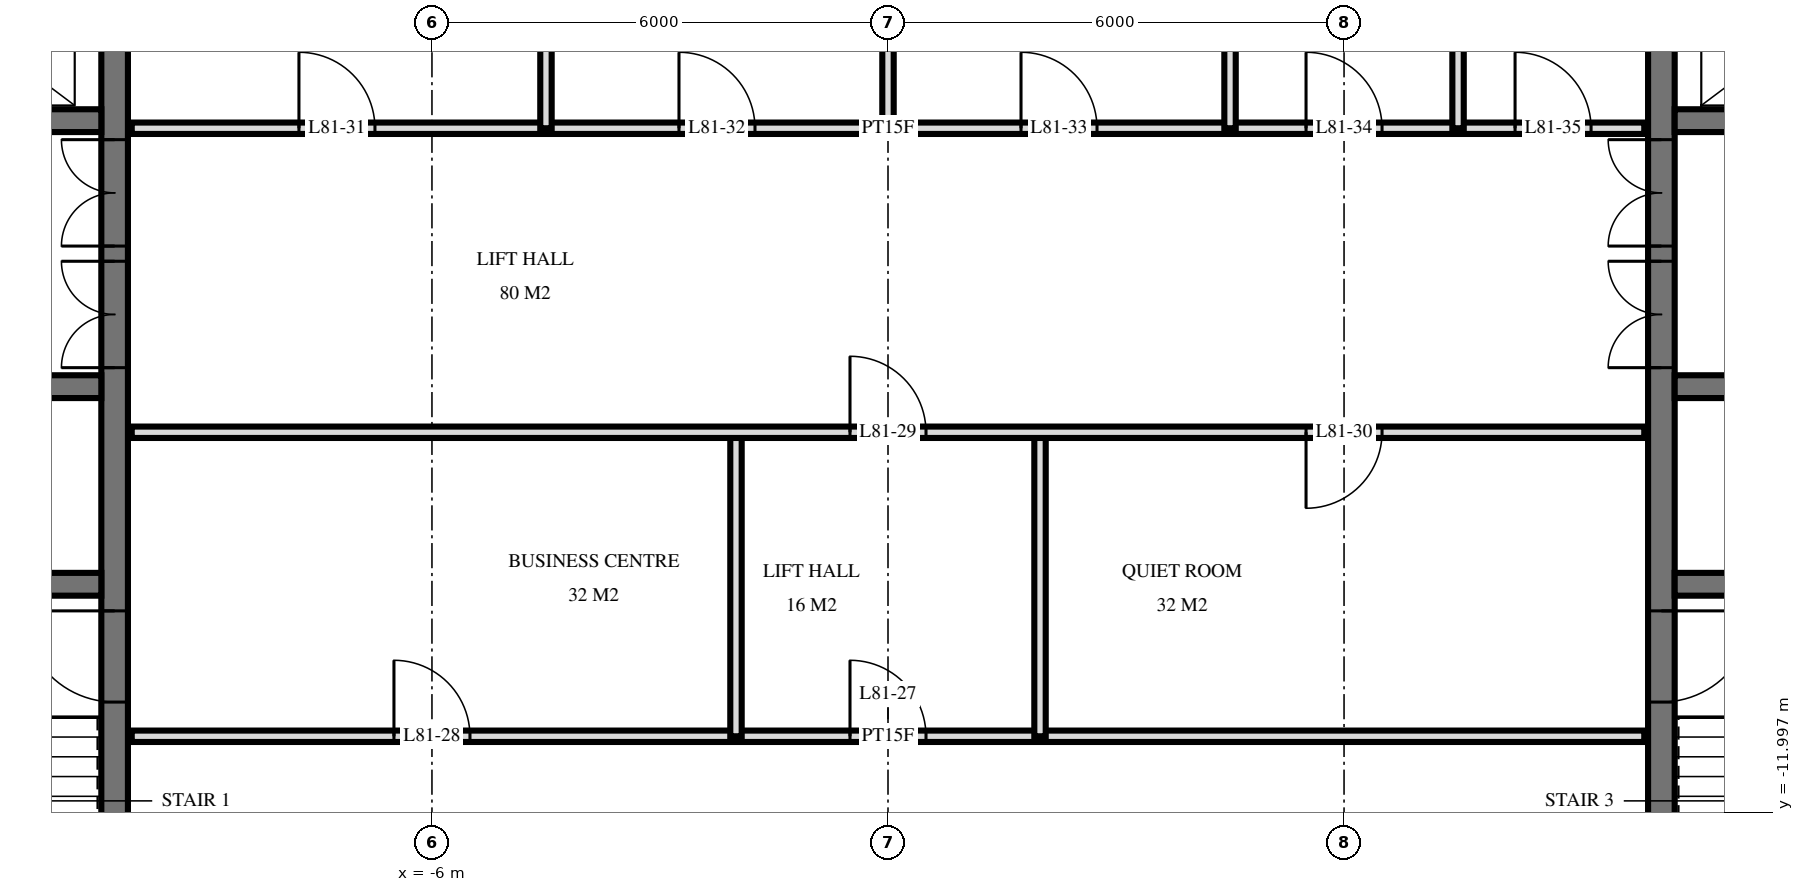
"""IFC4 building model, lengths in metres.
Left out: names, types, materials, properties, quantities, classifications, styles, units other than length and angle.
Written with IfcOpenShell. Run it as: python <this file> out.ifc"""

import sys

from ifc_helpers import new_model, si_unit, direction, frame, frame_2d, origin, place, context, subcontext, project, spatial, rectangle, extrude, element, fill, save


model = new_model("IFC4")
c1 = context("Model", 3, precision=1e-05, world=origin(), true_north=direction((0.0, 1.0)))
c2 = subcontext(c1, "Body", "Model", "MODEL_VIEW")
j1 = project(units=[si_unit("LENGTHUNIT", "METRE"), si_unit("PLANEANGLEUNIT", "RADIAN")], contexts=[c1])
p1 = place(None, origin())
s1 = spatial("IfcSite", under=j1, at=p1, CompositionType="ELEMENT")
p2 = place(p1, origin())
s2 = spatial("IfcBuilding", under=s1, at=p2, CompositionType="ELEMENT")
p3 = place(p2, frame((0.0, 0.0, 305.1)))
s3 = spatial("IfcBuildingStorey", under=s2, at=p3, CompositionType="ELEMENT", Elevation=305.1)
p4 = place(p3, frame((-10.175, -14.55, 0.0), z_axis=(0.0, 0.0, 1.0), x_axis=(0.0, 1.0, 0.0)))
e1 = element("IfcWall", 1, at=p4, inside=s3, PredefinedType="SHEAR", context=c2, shape_type="SweptSolid", body=[
    extrude(rectangle(XDim=14.1, YDim=0.35, at=frame_2d((7.05, 0.0))), origin(), (0.0, 0.0, 1.0), 3.5),
])
p5 = place(p4, frame((8.4, 0.0, 0.0)))
e2 = element("IfcOpeningElement", 2, at=p5, cuts=e1, PredefinedType="OPENING", context=c2, shape_type="SweptSolid", body=[
    extrude(rectangle(XDim=1.4, YDim=2.4, at=frame_2d((0.7, 1.2))), frame((0.0, 0.185, 0.0), z_axis=(0.0, -1.0, 0.0), x_axis=(1.0, 0.0, 0.0)), (0.0, 0.0, 1.0), 0.37),
])
p6 = place(p4, frame((10.0, 0.0, 0.0)))
e3 = element("IfcOpeningElement", 3, at=p6, cuts=e1, PredefinedType="OPENING", context=c2, shape_type="SweptSolid", body=[
    extrude(rectangle(XDim=1.4, YDim=2.4, at=frame_2d((0.7, 1.2))), frame((0.0, 0.185, 0.0), z_axis=(0.0, -1.0, 0.0), x_axis=(1.0, 0.0, 0.0)), (0.0, 0.0, 1.0), 0.37),
])
p7 = place(p4, frame((4.0, 0.0, 0.0)))
e4 = element("IfcOpeningElement", 4, at=p7, cuts=e1, PredefinedType="OPENING", context=c2, shape_type="SweptSolid", body=[
    extrude(rectangle(XDim=1.2, YDim=2.1, at=frame_2d((0.6, 1.05))), frame((0.0, 0.185, 0.0), z_axis=(0.0, -1.0, 0.0), x_axis=(1.0, 0.0, 0.0)), (0.0, 0.0, 1.0), 0.37),
])
p8 = place(p3, frame((-19.05, -2.9, 0.0), z_axis=(0.0, 0.0, 1.0), x_axis=(1.0, 0.0, 0.0)))
e5 = element("IfcWall", 5, at=p8, inside=s3, PredefinedType="SHEAR", context=c2, shape_type="SweptSolid", body=[
    extrude(rectangle(XDim=8.7, YDim=0.3, at=frame_2d((4.35, 0.0))), origin(), (0.0, 0.0, 1.0), 3.5),
])
p9 = place(p8, frame((6.8, 0.0, 0.0)))
e6 = element("IfcOpeningElement", 6, at=p9, cuts=e5, PredefinedType="OPENING", context=c2, shape_type="SweptSolid", body=[
    extrude(rectangle(XDim=1.1, YDim=2.1, at=frame_2d((0.55, 1.05))), frame((0.0, 0.16, 0.0), z_axis=(0.0, -1.0, 0.0), x_axis=(1.0, 0.0, 0.0)), (0.0, 0.0, 1.0), 0.32),
])
p10 = place(p8, frame((3.8, 0.0, 0.0)))
e7 = element("IfcOpeningElement", 7, at=p10, cuts=e5, PredefinedType="OPENING", context=c2, shape_type="SweptSolid", body=[
    extrude(rectangle(XDim=1.1, YDim=2.1, at=frame_2d((0.55, 1.05))), frame((0.0, 0.16, 0.0), z_axis=(0.0, -1.0, 0.0), x_axis=(1.0, 0.0, 0.0)), (0.0, 0.0, 1.0), 0.32),
])
p11 = place(p8, frame((0.9, 0.0, 0.0)))
e8 = element("IfcOpeningElement", 8, at=p11, cuts=e5, PredefinedType="OPENING", context=c2, shape_type="SweptSolid", body=[
    extrude(rectangle(XDim=0.9, YDim=2.1, at=frame_2d((0.45, 1.05))), frame((0.0, 0.16, 0.0), z_axis=(0.0, -1.0, 0.0), x_axis=(1.0, 0.0, 0.0)), (0.0, 0.0, 1.0), 0.32),
])
p12 = place(p3, frame((-19.05, -6.4, 0.0), z_axis=(0.0, 0.0, 1.0), x_axis=(1.0, 0.0, 0.0)))
e9 = element("IfcWall", 9, at=p12, inside=s3, PredefinedType="SHEAR", context=c2, shape_type="SweptSolid", body=[
    extrude(rectangle(XDim=8.7, YDim=0.3, at=frame_2d((4.35, 0.0))), origin(), (0.0, 0.0, 1.0), 3.5),
])
p13 = place(p12, frame((0.8, 0.0, 0.0)))
e10 = element("IfcOpeningElement", 10, at=p13, cuts=e9, PredefinedType="OPENING", context=c2, shape_type="SweptSolid", body=[
    extrude(rectangle(XDim=1.1, YDim=2.1, at=frame_2d((0.55, 1.05))), frame((0.0, 0.16, 0.0), z_axis=(0.0, -1.0, 0.0), x_axis=(1.0, 0.0, 0.0)), (0.0, 0.0, 1.0), 0.32),
])
p14 = place(p3, frame((-19.05, -9.0, 0.0), z_axis=(0.0, 0.0, 1.0), x_axis=(1.0, 0.0, 0.0)))
e11 = element("IfcWall", 11, at=p14, inside=s3, PredefinedType="SHEAR", context=c2, shape_type="SweptSolid", body=[
    extrude(rectangle(XDim=8.7, YDim=0.3, at=frame_2d((4.35, 0.0))), origin(), (0.0, 0.0, 1.0), 3.5),
])
p15 = place(p14, frame((3.8, 0.0, 0.0)))
e12 = element("IfcOpeningElement", 12, at=p15, cuts=e11, PredefinedType="OPENING", context=c2, shape_type="SweptSolid", body=[
    extrude(rectangle(XDim=1.1, YDim=2.1, at=frame_2d((0.55, 1.05))), frame((0.0, 0.16, 0.0), z_axis=(0.0, -1.0, 0.0), x_axis=(1.0, 0.0, 0.0)), (0.0, 0.0, 1.0), 0.32),
])
p16 = place(p3, frame((10.175, -14.55, 0.0), z_axis=(0.0, 0.0, 1.0), x_axis=(0.0, 1.0, 0.0)))
e13 = element("IfcWall", 13, at=p16, inside=s3, PredefinedType="SHEAR", context=c2, shape_type="SweptSolid", body=[
    extrude(rectangle(XDim=14.1, YDim=0.35, at=frame_2d((7.05, 0.0))), origin(), (0.0, 0.0, 1.0), 3.5),
])
p17 = place(p16, frame((8.4, 0.0, 0.0)))
e14 = element("IfcOpeningElement", 14, at=p17, cuts=e13, PredefinedType="OPENING", context=c2, shape_type="SweptSolid", body=[
    extrude(rectangle(XDim=1.4, YDim=2.4, at=frame_2d((0.7, 1.2))), frame((0.0, 0.185, 0.0), z_axis=(0.0, -1.0, 0.0), x_axis=(1.0, 0.0, 0.0)), (0.0, 0.0, 1.0), 0.37),
])
p18 = place(p16, frame((10.0, 0.0, 0.0)))
e15 = element("IfcOpeningElement", 15, at=p18, cuts=e13, PredefinedType="OPENING", context=c2, shape_type="SweptSolid", body=[
    extrude(rectangle(XDim=1.4, YDim=2.4, at=frame_2d((0.7, 1.2))), frame((0.0, 0.185, 0.0), z_axis=(0.0, -1.0, 0.0), x_axis=(1.0, 0.0, 0.0)), (0.0, 0.0, 1.0), 0.37),
])
p19 = place(p16, frame((4.0, 0.0, 0.0)))
e16 = element("IfcOpeningElement", 16, at=p19, cuts=e13, PredefinedType="OPENING", context=c2, shape_type="SweptSolid", body=[
    extrude(rectangle(XDim=1.2, YDim=2.1, at=frame_2d((0.6, 1.05))), frame((0.0, 0.185, 0.0), z_axis=(0.0, -1.0, 0.0), x_axis=(1.0, 0.0, 0.0)), (0.0, 0.0, 1.0), 0.37),
])
p20 = place(p3, frame((10.35, -2.9, 0.0), z_axis=(0.0, 0.0, 1.0), x_axis=(1.0, 0.0, 0.0)))
e17 = element("IfcWall", 17, at=p20, inside=s3, PredefinedType="SHEAR", context=c2, shape_type="SweptSolid", body=[
    extrude(rectangle(XDim=8.7, YDim=0.3, at=frame_2d((4.35, 0.0))), origin(), (0.0, 0.0, 1.0), 3.5),
])
p21 = place(p20, frame((0.8, 0.0, 0.0)))
e18 = element("IfcOpeningElement", 18, at=p21, cuts=e17, PredefinedType="OPENING", context=c2, shape_type="SweptSolid", body=[
    extrude(rectangle(XDim=1.1, YDim=2.1, at=frame_2d((0.55, 1.05))), frame((0.0, 0.16, 0.0), z_axis=(0.0, -1.0, 0.0), x_axis=(1.0, 0.0, 0.0)), (0.0, 0.0, 1.0), 0.32),
])
p22 = place(p20, frame((3.8, 0.0, 0.0)))
e19 = element("IfcOpeningElement", 19, at=p22, cuts=e17, PredefinedType="OPENING", context=c2, shape_type="SweptSolid", body=[
    extrude(rectangle(XDim=1.1, YDim=2.1, at=frame_2d((0.55, 1.05))), frame((0.0, 0.16, 0.0), z_axis=(0.0, -1.0, 0.0), x_axis=(1.0, 0.0, 0.0)), (0.0, 0.0, 1.0), 0.32),
])
p23 = place(p20, frame((6.9, 0.0, 0.0)))
e20 = element("IfcOpeningElement", 20, at=p23, cuts=e17, PredefinedType="OPENING", context=c2, shape_type="SweptSolid", body=[
    extrude(rectangle(XDim=0.9, YDim=2.1, at=frame_2d((0.45, 1.05))), frame((0.0, 0.16, 0.0), z_axis=(0.0, -1.0, 0.0), x_axis=(1.0, 0.0, 0.0)), (0.0, 0.0, 1.0), 0.32),
])
p24 = place(p3, frame((10.35, -6.4, 0.0), z_axis=(0.0, 0.0, 1.0), x_axis=(1.0, 0.0, 0.0)))
e21 = element("IfcWall", 21, at=p24, inside=s3, PredefinedType="SHEAR", context=c2, shape_type="SweptSolid", body=[
    extrude(rectangle(XDim=8.7, YDim=0.3, at=frame_2d((4.35, 0.0))), origin(), (0.0, 0.0, 1.0), 3.5),
])
p25 = place(p24, frame((6.8, 0.0, 0.0)))
e22 = element("IfcOpeningElement", 22, at=p25, cuts=e21, PredefinedType="OPENING", context=c2, shape_type="SweptSolid", body=[
    extrude(rectangle(XDim=1.1, YDim=2.1, at=frame_2d((0.55, 1.05))), frame((0.0, 0.16, 0.0), z_axis=(0.0, -1.0, 0.0), x_axis=(1.0, 0.0, 0.0)), (0.0, 0.0, 1.0), 0.32),
])
p26 = place(p3, frame((10.35, -9.0, 0.0), z_axis=(0.0, 0.0, 1.0), x_axis=(1.0, 0.0, 0.0)))
e23 = element("IfcWall", 23, at=p26, inside=s3, PredefinedType="SHEAR", context=c2, shape_type="SweptSolid", body=[
    extrude(rectangle(XDim=8.7, YDim=0.3, at=frame_2d((4.35, 0.0))), origin(), (0.0, 0.0, 1.0), 3.5),
])
p27 = place(p26, frame((3.8, 0.0, 0.0)))
e24 = element("IfcOpeningElement", 24, at=p27, cuts=e23, PredefinedType="OPENING", context=c2, shape_type="SweptSolid", body=[
    extrude(rectangle(XDim=1.1, YDim=2.1, at=frame_2d((0.55, 1.05))), frame((0.0, 0.16, 0.0), z_axis=(0.0, -1.0, 0.0), x_axis=(1.0, 0.0, 0.0)), (0.0, 0.0, 1.0), 0.32),
])
for number, where, z_axis, x_axis in (
    (25, (7.5, -3.0, 0.0), (0.0, 0.0, 1.0), (0.0, 1.0, 0.0)),
    (26, (4.5, -3.0, 0.0), (0.0, 0.0, 1.0), (0.0, 1.0, 0.0)),
):
    element("IfcWall", number, at=place(p3, frame(where, z_axis=z_axis, x_axis=x_axis)), inside=s3, PredefinedType="PLUMBINGWALL", context=c2, shape_type="SweptSolid", body=[
        extrude(rectangle(XDim=4.02, YDim=0.15, at=frame_2d((2.01, 0.0))), origin(), (0.0, 0.0, 1.0), 3.22),
    ])
p28 = place(p3, frame((2.0, -11.0, 0.0), z_axis=(0.0, 0.0, 1.0), x_axis=(0.0, 1.0, 0.0)))
e27 = element("IfcWall", 27, at=p28, inside=s3, PredefinedType="PARTITIONING", context=c2, shape_type="SweptSolid", body=[
    extrude(rectangle(XDim=4.0, YDim=0.15, at=frame_2d((2.0, 0.0))), origin(), (0.0, 0.0, 1.0), 3.22),
])
p29 = place(p3, frame((0.0, -3.0, 0.0), z_axis=(0.0, 0.0, 1.0), x_axis=(0.0, 1.0, 0.0)))
e28 = element("IfcWall", 28, at=p29, inside=s3, PredefinedType="PARTITIONING", context=c2, shape_type="SweptSolid", body=[
    extrude(rectangle(XDim=4.02, YDim=0.15, at=frame_2d((2.01, 0.0))), origin(), (0.0, 0.0, 1.0), 3.22),
])
p30 = place(p3, frame((-2.0, -11.0, 0.0), z_axis=(0.0, 0.0, 1.0), x_axis=(0.0, 1.0, 0.0)))
e29 = element("IfcWall", 29, at=p30, inside=s3, PredefinedType="PARTITIONING", context=c2, shape_type="SweptSolid", body=[
    extrude(rectangle(XDim=4.0, YDim=0.15, at=frame_2d((2.0, 0.0))), origin(), (0.0, 0.0, 1.0), 3.22),
])
p31 = place(p3, frame((-4.5, -3.0, 0.0), z_axis=(0.0, 0.0, 1.0), x_axis=(0.0, 1.0, 0.0)))
e30 = element("IfcWall", 30, at=p31, inside=s3, PredefinedType="PARTITIONING", context=c2, shape_type="SweptSolid", body=[
    extrude(rectangle(XDim=4.02, YDim=0.15, at=frame_2d((2.01, 0.0))), origin(), (0.0, 0.0, 1.0), 3.22),
])
p32 = place(p3, frame((-9.95, -11.0, 0.0), z_axis=(0.0, 0.0, 1.0), x_axis=(1.0, 0.0, 0.0)))
e31 = element("IfcWall", 31, at=p32, inside=s3, PredefinedType="PARTITIONING", context=c2, shape_type="SweptSolid", body=[
    extrude(rectangle(XDim=19.9, YDim=0.15, at=frame_2d((9.95, 0.0))), origin(), (0.0, 0.0, 1.0), 3.22),
])
p33 = place(p32, frame((9.45, 0.0, 0.0)))
e32 = element("IfcOpeningElement", 32, at=p33, cuts=e31, PredefinedType="OPENING", context=c2, shape_type="SweptSolid", body=[
    extrude(rectangle(XDim=1.0, YDim=2.1, at=frame_2d((0.5, 1.05))), frame((0.0, 0.085, 0.0), z_axis=(0.0, -1.0, 0.0), x_axis=(1.0, 0.0, 0.0)), (0.0, 0.0, 1.0), 0.17),
])
p34 = place(p32, frame((3.45, 0.0, 0.0)))
e33 = element("IfcOpeningElement", 33, at=p34, cuts=e31, PredefinedType="OPENING", context=c2, shape_type="SweptSolid", body=[
    extrude(rectangle(XDim=1.0, YDim=2.1, at=frame_2d((0.5, 1.05))), frame((0.0, 0.085, 0.0), z_axis=(0.0, -1.0, 0.0), x_axis=(1.0, 0.0, 0.0)), (0.0, 0.0, 1.0), 0.17),
])
p35 = place(p3, frame((-9.95, -7.0, 0.0), z_axis=(0.0, 0.0, 1.0), x_axis=(1.0, 0.0, 0.0)))
e34 = element("IfcWall", 34, at=p35, inside=s3, PredefinedType="PARTITIONING", context=c2, shape_type="SweptSolid", body=[
    extrude(rectangle(XDim=19.9, YDim=0.15, at=frame_2d((9.95, 0.0))), origin(), (0.0, 0.0, 1.0), 3.22),
])
p36 = place(p35, frame((9.45, 0.0, 0.0)))
e35 = element("IfcOpeningElement", 35, at=p36, cuts=e34, PredefinedType="OPENING", context=c2, shape_type="SweptSolid", body=[
    extrude(rectangle(XDim=1.0, YDim=2.1, at=frame_2d((0.5, 1.05))), frame((0.0, 0.085, 0.0), z_axis=(0.0, -1.0, 0.0), x_axis=(1.0, 0.0, 0.0)), (0.0, 0.0, 1.0), 0.17),
])
p37 = place(p35, frame((15.45, 0.0, 0.0)))
e36 = element("IfcOpeningElement", 36, at=p37, cuts=e34, PredefinedType="OPENING", context=c2, shape_type="SweptSolid", body=[
    extrude(rectangle(XDim=1.0, YDim=2.1, at=frame_2d((0.5, 1.05))), frame((0.0, 0.085, 0.0), z_axis=(0.0, -1.0, 0.0), x_axis=(1.0, 0.0, 0.0)), (0.0, 0.0, 1.0), 0.17),
])
p38 = place(p3, frame((-9.95, -3.0, 0.0), z_axis=(0.0, 0.0, 1.0), x_axis=(1.0, 0.0, 0.0)))
e37 = element("IfcWall", 37, at=p38, inside=s3, PredefinedType="PARTITIONING", context=c2, shape_type="SweptSolid", body=[
    extrude(rectangle(XDim=19.9, YDim=0.15, at=frame_2d((9.95, 0.0))), origin(), (0.0, 0.0, 1.0), 3.22),
])
p39 = place(p38, frame((2.2, 0.0, 0.0)))
e38 = element("IfcOpeningElement", 38, at=p39, cuts=e37, PredefinedType="OPENING", context=c2, shape_type="SweptSolid", body=[
    extrude(rectangle(XDim=1.0, YDim=2.1, at=frame_2d((0.5, 1.05))), frame((0.0, 0.085, 0.0), z_axis=(0.0, -1.0, 0.0), x_axis=(1.0, 0.0, 0.0)), (0.0, 0.0, 1.0), 0.17),
])
p40 = place(p38, frame((7.2, 0.0, 0.0)))
e39 = element("IfcOpeningElement", 39, at=p40, cuts=e37, PredefinedType="OPENING", context=c2, shape_type="SweptSolid", body=[
    extrude(rectangle(XDim=1.0, YDim=2.1, at=frame_2d((0.5, 1.05))), frame((0.0, 0.085, 0.0), z_axis=(0.0, -1.0, 0.0), x_axis=(1.0, 0.0, 0.0)), (0.0, 0.0, 1.0), 0.17),
])
p41 = place(p38, frame((11.7, 0.0, 0.0)))
e40 = element("IfcOpeningElement", 40, at=p41, cuts=e37, PredefinedType="OPENING", context=c2, shape_type="SweptSolid", body=[
    extrude(rectangle(XDim=1.0, YDim=2.1, at=frame_2d((0.5, 1.05))), frame((0.0, 0.085, 0.0), z_axis=(0.0, -1.0, 0.0), x_axis=(1.0, 0.0, 0.0)), (0.0, 0.0, 1.0), 0.17),
])
p42 = place(p38, frame((15.45, 0.0, 0.0)))
e41 = element("IfcOpeningElement", 41, at=p42, cuts=e37, PredefinedType="OPENING", context=c2, shape_type="SweptSolid", body=[
    extrude(rectangle(XDim=1.0, YDim=2.1, at=frame_2d((0.5, 1.05))), frame((0.0, 0.085, 0.0), z_axis=(0.0, -1.0, 0.0), x_axis=(1.0, 0.0, 0.0)), (0.0, 0.0, 1.0), 0.17),
])
p43 = place(p38, frame((18.2, 0.0, 0.0)))
e42 = element("IfcOpeningElement", 42, at=p43, cuts=e37, PredefinedType="OPENING", context=c2, shape_type="SweptSolid", body=[
    extrude(rectangle(XDim=1.0, YDim=2.1, at=frame_2d((0.5, 1.05))), frame((0.0, 0.085, 0.0), z_axis=(0.0, -1.0, 0.0), x_axis=(1.0, 0.0, 0.0)), (0.0, 0.0, 1.0), 0.17),
])
p44 = place(p5, origin())
e43 = element("IfcDoor", 43, at=p44, inside=s3, OperationType="DOUBLE_DOOR_SINGLE_SWING", PredefinedType="DOOR", context=c2, shape_type="SweptSolid", body=[
    extrude(rectangle(XDim=1.4, YDim=2.4, at=frame_2d((0.7, 1.2))), frame((0.0, 0.025, 0.0), z_axis=(0.0, -1.0, 0.0), x_axis=(1.0, 0.0, 0.0)), (0.0, 0.0, 1.0), 0.05),
])
fill(e2, e43)
p45 = place(p6, origin())
e44 = element("IfcDoor", 44, at=p45, inside=s3, OperationType="DOUBLE_DOOR_SINGLE_SWING", PredefinedType="DOOR", context=c2, shape_type="SweptSolid", body=[
    extrude(rectangle(XDim=1.4, YDim=2.4, at=frame_2d((0.7, 1.2))), frame((0.0, 0.025, 0.0), z_axis=(0.0, -1.0, 0.0), x_axis=(1.0, 0.0, 0.0)), (0.0, 0.0, 1.0), 0.05),
])
fill(e3, e44)
p46 = place(p7, origin())
e45 = element("IfcDoor", 45, at=p46, inside=s3, OperationType="SINGLE_SWING_LEFT", PredefinedType="DOOR", context=c2, shape_type="SweptSolid", body=[
    extrude(rectangle(XDim=1.2, YDim=2.1, at=frame_2d((0.6, 1.05))), frame((0.0, 0.025, 0.0), z_axis=(0.0, -1.0, 0.0), x_axis=(1.0, 0.0, 0.0)), (0.0, 0.0, 1.0), 0.05),
])
fill(e4, e45)
p47 = place(p17, origin())
e46 = element("IfcDoor", 46, at=p47, inside=s3, OperationType="DOUBLE_DOOR_SINGLE_SWING", PredefinedType="DOOR", context=c2, shape_type="SweptSolid", body=[
    extrude(rectangle(XDim=1.4, YDim=2.4, at=frame_2d((0.7, 1.2))), frame((0.0, 0.025, 0.0), z_axis=(0.0, -1.0, 0.0), x_axis=(1.0, 0.0, 0.0)), (0.0, 0.0, 1.0), 0.05),
])
fill(e14, e46)
p48 = place(p18, origin())
e47 = element("IfcDoor", 47, at=p48, inside=s3, OperationType="DOUBLE_DOOR_SINGLE_SWING", PredefinedType="DOOR", context=c2, shape_type="SweptSolid", body=[
    extrude(rectangle(XDim=1.4, YDim=2.4, at=frame_2d((0.7, 1.2))), frame((0.0, 0.025, 0.0), z_axis=(0.0, -1.0, 0.0), x_axis=(1.0, 0.0, 0.0)), (0.0, 0.0, 1.0), 0.05),
])
fill(e15, e47)
p49 = place(p19, frame((0.6, 0.0, 0.0), z_axis=(0.0, 0.0, 1.0), x_axis=(-1.0, 0.0, 0.0)))
e48 = element("IfcDoor", 48, at=p49, inside=s3, OperationType="SINGLE_SWING_RIGHT", PredefinedType="DOOR", context=c2, shape_type="SweptSolid", body=[
    extrude(rectangle(XDim=1.2, YDim=2.1, at=frame_2d((0.0, 1.05))), frame((0.0, -0.025, 0.0), z_axis=(0.0, 1.0, 0.0), x_axis=(-1.0, 0.0, 0.0)), (0.0, 0.0, 1.0), 0.05),
])
fill(e16, e48)
p50 = place(p33, origin())
e49 = element("IfcDoor", 49, at=p50, inside=s3, OperationType="SINGLE_SWING_RIGHT", PredefinedType="DOOR", context=c2, shape_type="SweptSolid", body=[
    extrude(rectangle(XDim=1.0, YDim=2.1, at=frame_2d((0.5, 1.05))), frame((0.0, 0.025, 0.0), z_axis=(0.0, -1.0, 0.0), x_axis=(1.0, 0.0, 0.0)), (0.0, 0.0, 1.0), 0.05),
])
fill(e32, e49)
p51 = place(p34, origin())
e50 = element("IfcDoor", 50, at=p51, inside=s3, OperationType="SINGLE_SWING_RIGHT", PredefinedType="DOOR", context=c2, shape_type="SweptSolid", body=[
    extrude(rectangle(XDim=1.0, YDim=2.1, at=frame_2d((0.5, 1.05))), frame((0.0, 0.025, 0.0), z_axis=(0.0, -1.0, 0.0), x_axis=(1.0, 0.0, 0.0)), (0.0, 0.0, 1.0), 0.05),
])
fill(e33, e50)
p52 = place(p36, origin())
e51 = element("IfcDoor", 51, at=p52, inside=s3, OperationType="SINGLE_SWING_RIGHT", PredefinedType="DOOR", context=c2, shape_type="SweptSolid", body=[
    extrude(rectangle(XDim=1.0, YDim=2.1, at=frame_2d((0.5, 1.05))), frame((0.0, 0.025, 0.0), z_axis=(0.0, -1.0, 0.0), x_axis=(1.0, 0.0, 0.0)), (0.0, 0.0, 1.0), 0.05),
])
fill(e35, e51)
p53 = place(p37, frame((0.5, 0.0, 0.0), z_axis=(0.0, 0.0, 1.0), x_axis=(-1.0, 0.0, 0.0)))
e52 = element("IfcDoor", 52, at=p53, inside=s3, OperationType="SINGLE_SWING_LEFT", PredefinedType="DOOR", context=c2, shape_type="SweptSolid", body=[
    extrude(rectangle(XDim=1.0, YDim=2.1, at=frame_2d((0.0, 1.05))), frame((0.0, -0.025, 0.0), z_axis=(0.0, 1.0, 0.0), x_axis=(-1.0, 0.0, 0.0)), (0.0, 0.0, 1.0), 0.05),
])
fill(e36, e52)
p54 = place(p39, origin())
e53 = element("IfcDoor", 53, at=p54, inside=s3, OperationType="SINGLE_SWING_RIGHT", PredefinedType="DOOR", context=c2, shape_type="SweptSolid", body=[
    extrude(rectangle(XDim=1.0, YDim=2.1, at=frame_2d((0.5, 1.05))), frame((0.0, 0.025, 0.0), z_axis=(0.0, -1.0, 0.0), x_axis=(1.0, 0.0, 0.0)), (0.0, 0.0, 1.0), 0.05),
])
fill(e38, e53)
p55 = place(p40, origin())
e54 = element("IfcDoor", 54, at=p55, inside=s3, OperationType="SINGLE_SWING_RIGHT", PredefinedType="DOOR", context=c2, shape_type="SweptSolid", body=[
    extrude(rectangle(XDim=1.0, YDim=2.1, at=frame_2d((0.5, 1.05))), frame((0.0, 0.025, 0.0), z_axis=(0.0, -1.0, 0.0), x_axis=(1.0, 0.0, 0.0)), (0.0, 0.0, 1.0), 0.05),
])
fill(e39, e54)
p56 = place(p41, origin())
e55 = element("IfcDoor", 55, at=p56, inside=s3, OperationType="SINGLE_SWING_RIGHT", PredefinedType="DOOR", context=c2, shape_type="SweptSolid", body=[
    extrude(rectangle(XDim=1.0, YDim=2.1, at=frame_2d((0.5, 1.05))), frame((0.0, 0.025, 0.0), z_axis=(0.0, -1.0, 0.0), x_axis=(1.0, 0.0, 0.0)), (0.0, 0.0, 1.0), 0.05),
])
fill(e40, e55)
p57 = place(p42, origin())
e56 = element("IfcDoor", 56, at=p57, inside=s3, OperationType="SINGLE_SWING_RIGHT", PredefinedType="DOOR", context=c2, shape_type="SweptSolid", body=[
    extrude(rectangle(XDim=1.0, YDim=2.1, at=frame_2d((0.5, 1.05))), frame((0.0, 0.025, 0.0), z_axis=(0.0, -1.0, 0.0), x_axis=(1.0, 0.0, 0.0)), (0.0, 0.0, 1.0), 0.05),
])
fill(e41, e56)
p58 = place(p43, origin())
e57 = element("IfcDoor", 57, at=p58, inside=s3, OperationType="SINGLE_SWING_RIGHT", PredefinedType="DOOR", context=c2, shape_type="SweptSolid", body=[
    extrude(rectangle(XDim=1.0, YDim=2.1, at=frame_2d((0.5, 1.05))), frame((0.0, 0.025, 0.0), z_axis=(0.0, -1.0, 0.0), x_axis=(1.0, 0.0, 0.0)), (0.0, 0.0, 1.0), 0.05),
])
fill(e42, e57)
save(model, sys.argv[1])
